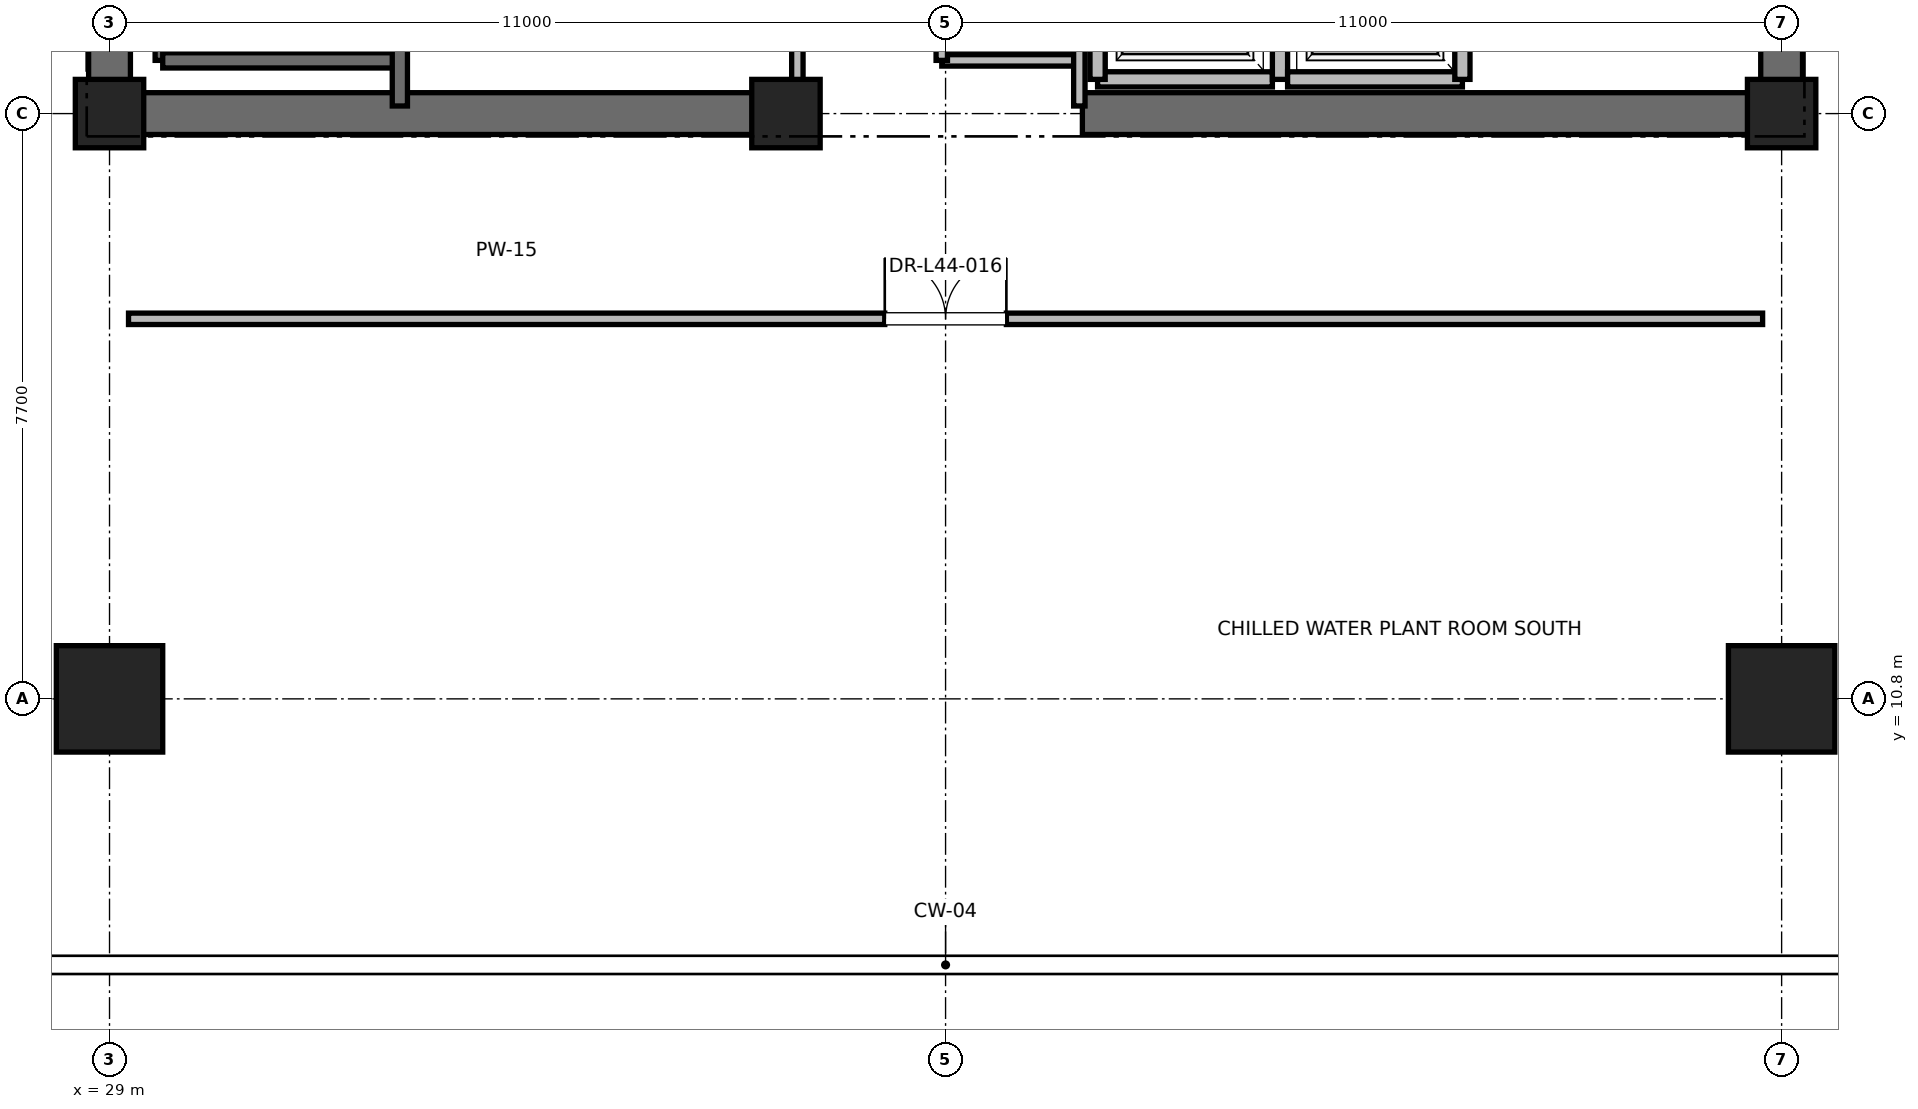
"""IFC4 building model, lengths in metres.
Left out: names, types, materials, properties, quantities, classifications, styles, units other than length and angle.
Written with IfcOpenShell. Run it as: python <this file> out.ifc"""

import sys

from ifc_helpers import new_model, si_unit, direction, frame, frame_2d, origin, origin_2d, place, context, subcontext, project, spatial, rectangle, extrude, element, fill, save


model = new_model("IFC4")
c1 = context("Model", 3, precision=1e-05, world=origin(), true_north=direction((0.0, 1.0)))
c2 = subcontext(c1, "Body", "Model", "MODEL_VIEW")
j1 = project(units=[si_unit("LENGTHUNIT", "METRE"), si_unit("PLANEANGLEUNIT", "RADIAN")], contexts=[c1])
p1 = place(None, origin())
s1 = spatial("IfcSite", under=j1, at=p1, CompositionType="ELEMENT")
p2 = place(p1, origin())
s2 = spatial("IfcBuilding", under=s1, at=p2, CompositionType="ELEMENT")
p3 = place(p2, frame((0.0, 0.0, 189.4)))
s3 = spatial("IfcBuildingStorey", under=s2, at=p3, CompositionType="ELEMENT", Elevation=189.4)
for number, where, z_axis, x_axis in (
    (1, (29.0, 10.8, 0.0), (0.0, 0.0, 1.0), (1.0, 0.0, 0.0)),
    (2, (51.0, 10.8, 0.0), (0.0, 0.0, 1.0), (1.0, 0.0, 0.0)),
):
    element("IfcColumn", number, at=place(p3, frame(where, z_axis=z_axis, x_axis=x_axis)), inside=s3, PredefinedType="COLUMN", context=c2, shape_type="SweptSolid", body=[
        extrude(rectangle(XDim=1.4, YDim=1.4, at=origin_2d()), origin(), (0.0, 0.0, 1.0), 5.4),
    ])
for number, where, z_axis, x_axis in (
    (3, (29.0, 18.5, 0.0), (0.0, 0.0, 1.0), (1.0, 0.0, 0.0)),
    (4, (51.0, 18.5, 0.0), (0.0, 0.0, 1.0), (1.0, 0.0, 0.0)),
    (5, (37.9, 18.5, 0.0), (0.0, 0.0, 1.0), (1.0, 0.0, 0.0)),
):
    element("IfcColumn", number, at=place(p3, frame(where, z_axis=z_axis, x_axis=x_axis)), inside=s3, PredefinedType="PILASTER", context=c2, shape_type="SweptSolid", body=[
        extrude(rectangle(XDim=0.9, YDim=0.9, at=origin_2d()), origin(), (0.0, 0.0, 1.0), 5.4),
    ])
for number, where, z_axis, x_axis in (
    (6, (29.0, 18.5, 0.0), (0.0, 0.0, 1.0), (1.0, 0.0, 0.0)),
    (7, (41.8, 18.5, 0.0), (0.0, 0.0, 1.0), (1.0, 0.0, 0.0)),
):
    element("IfcWall", number, at=place(p3, frame(where, z_axis=z_axis, x_axis=x_axis)), inside=s3, PredefinedType="SHEAR", context=c2, shape_type="SweptSolid", body=[
        extrude(rectangle(XDim=9.2, YDim=0.55, at=frame_2d((4.6, 0.0))), origin(), (0.0, 0.0, 1.0), 5.1),
    ])
p4 = place(p3, frame((29.0, 18.5, 0.0), z_axis=(0.0, 0.0, 1.0), x_axis=(0.0, 1.0, 0.0)))
e8 = element("IfcWall", 8, at=p4, inside=s3, PredefinedType="SHEAR", context=c2, shape_type="SweptSolid", body=[
    extrude(rectangle(XDim=8.8, YDim=0.55, at=frame_2d((4.4, 0.0))), origin(), (0.0, 0.0, 1.0), 5.1),
])
p5 = place(p3, frame((51.0, 18.5, 0.0), z_axis=(0.0, 0.0, 1.0), x_axis=(0.0, 1.0, 0.0)))
e9 = element("IfcWall", 9, at=p5, inside=s3, PredefinedType="SHEAR", context=c2, shape_type="SweptSolid", body=[
    extrude(rectangle(XDim=5.8, YDim=0.55, at=frame_2d((2.9, 0.0))), origin(), (0.0, 0.0, 1.0), 5.1),
])
p6 = place(p3, frame((29.7, 19.2, 0.0), z_axis=(0.0, 0.0, 1.0), x_axis=(0.0, 1.0, 0.0)))
e10 = element("IfcWall", 10, at=p6, inside=s3, PredefinedType="SOLIDWALL", context=c2, shape_type="SweptSolid", body=[
    extrude(rectangle(XDim=8.15, YDim=0.2, at=frame_2d((4.075, 0.0))), origin(), (0.0, 0.0, 1.0), 5.1),
])
p7 = place(p3, frame((29.7, 19.2, 0.0), z_axis=(0.0, 0.0, 1.0), x_axis=(1.0, 0.0, 0.0)))
e11 = element("IfcWall", 11, at=p7, inside=s3, PredefinedType="SOLIDWALL", context=c2, shape_type="SweptSolid", body=[
    extrude(rectangle(XDim=3.12, YDim=0.2, at=frame_2d((1.56, 0.0))), origin(), (0.0, 0.0, 1.0), 5.1),
])
p8 = place(p3, frame((32.82, 18.6, 0.0), z_axis=(0.0, 0.0, 1.0), x_axis=(0.0, 1.0, 0.0)))
e12 = element("IfcWall", 12, at=p8, inside=s3, PredefinedType="SOLIDWALL", context=c2, shape_type="SweptSolid", body=[
    extrude(rectangle(XDim=8.78, YDim=0.2, at=frame_2d((4.39, 0.0))), origin(), (0.0, 0.0, 1.0), 5.1),
])
p9 = place(p3, frame((42.0, 18.95, 0.0), z_axis=(0.0, 0.0, 1.0), x_axis=(1.0, 0.0, 0.0)))
e13 = element("IfcWall", 13, at=p9, inside=s3, PredefinedType="SOLIDWALL", context=c2, shape_type="SweptSolid", body=[
    extrude(rectangle(XDim=2.3, YDim=0.2, at=frame_2d((1.15, 0.0))), origin(), (0.0, 0.0, 1.0), 4.08),
])
p10 = place(p3, frame((42.0, 21.55, 0.0), z_axis=(0.0, 0.0, 1.0), x_axis=(0.0, -1.0, 0.0)))
e14 = element("IfcWall", 14, at=p10, inside=s3, PredefinedType="SOLIDWALL", context=c2, shape_type="SweptSolid", body=[
    extrude(rectangle(XDim=2.6, YDim=0.2, at=frame_2d((1.3, 0.0))), origin(), (0.0, 0.0, 1.0), 4.08),
])
p11 = place(p3, frame((44.4, 18.95, 0.0), z_axis=(0.0, 0.0, 1.0), x_axis=(0.0, 1.0, 0.0)))
e15 = element("IfcWall", 15, at=p11, inside=s3, PredefinedType="SOLIDWALL", context=c2, shape_type="SweptSolid", body=[
    extrude(rectangle(XDim=2.6, YDim=0.2, at=frame_2d((1.3, 0.0))), origin(), (0.0, 0.0, 1.0), 5.1),
])
p12 = place(p3, frame((44.5, 18.95, 0.0), z_axis=(0.0, 0.0, 1.0), x_axis=(1.0, 0.0, 0.0)))
e16 = element("IfcWall", 16, at=p12, inside=s3, PredefinedType="SOLIDWALL", context=c2, shape_type="SweptSolid", body=[
    extrude(rectangle(XDim=2.3, YDim=0.2, at=frame_2d((1.15, 0.0))), origin(), (0.0, 0.0, 1.0), 5.1),
])
p13 = place(p3, frame((46.8, 18.95, 0.0), z_axis=(0.0, 0.0, 1.0), x_axis=(0.0, 1.0, 0.0)))
e17 = element("IfcWall", 17, at=p13, inside=s3, PredefinedType="SOLIDWALL", context=c2, shape_type="SweptSolid", body=[
    extrude(rectangle(XDim=2.6, YDim=0.2, at=frame_2d((1.3, 0.0))), origin(), (0.0, 0.0, 1.0), 5.1),
])
p14 = place(p3, frame((39.95, 19.2, 0.0), z_axis=(0.0, 0.0, 1.0), x_axis=(1.0, 0.0, 0.0)))
e18 = element("IfcWall", 18, at=p14, inside=s3, PredefinedType="PARTITIONING", context=c2, shape_type="SweptSolid", body=[
    extrude(rectangle(XDim=1.81, YDim=0.15, at=frame_2d((0.905, 0.0))), origin(), (0.0, 0.0, 1.0), 2.85),
])
p15 = place(p3, frame((41.76, 18.6, 0.0), z_axis=(0.0, 0.0, 1.0), x_axis=(0.0, 1.0, 0.0)))
e19 = element("IfcWall", 19, at=p15, inside=s3, PredefinedType="PARTITIONING", context=c2, shape_type="SweptSolid", body=[
    extrude(rectangle(XDim=3.6, YDim=0.15, at=frame_2d((1.8, 0.0))), origin(), (0.0, 0.0, 1.0), 2.85),
])
p16 = place(p3, frame((39.95, 19.2, 0.0), z_axis=(0.0, 0.0, 1.0), x_axis=(0.0, 1.0, 0.0)))
e20 = element("IfcWall", 20, at=p16, inside=s3, PredefinedType="PARTITIONING", context=c2, shape_type="SweptSolid", body=[
    extrude(rectangle(XDim=3.0, YDim=0.15, at=frame_2d((1.5, 0.0))), origin(), (0.0, 0.0, 1.0), 2.85),
])
p17 = place(p16, frame((1.05, 0.0, 0.0)))
e21 = element("IfcOpeningElement", 21, at=p17, cuts=e20, PredefinedType="OPENING", context=c2, shape_type="SweptSolid", body=[
    extrude(rectangle(XDim=0.9, YDim=2.1, at=frame_2d((0.45, 1.05))), frame((0.0, 0.075, 0.0), z_axis=(0.0, -1.0, 0.0), x_axis=(1.0, 0.0, 0.0)), (0.0, 0.0, 1.0), 0.15),
])
p18 = place(p3, frame((38.05, 18.6, 0.0), z_axis=(0.0, 0.0, 1.0), x_axis=(0.0, 1.0, 0.0)))
e22 = element("IfcWall", 22, at=p18, inside=s3, PredefinedType="PARTITIONING", context=c2, shape_type="SweptSolid", body=[
    extrude(rectangle(XDim=4.46, YDim=0.15, at=frame_2d((2.23, 0.0))), origin(), (0.0, 0.0, 1.0), 2.85),
])
p19 = place(p18, frame((1.79, 0.0, 0.0)))
e23 = element("IfcOpeningElement", 23, at=p19, cuts=e22, PredefinedType="OPENING", context=c2, shape_type="SweptSolid", body=[
    extrude(rectangle(XDim=0.88, YDim=2.1, at=frame_2d((0.44, 1.05))), frame((0.0, 0.075, 0.0), z_axis=(0.0, -1.0, 0.0), x_axis=(1.0, 0.0, 0.0)), (0.0, 0.0, 1.0), 0.15),
])
p20 = place(p3, frame((29.25, 15.8, 0.0), z_axis=(0.0, 0.0, 1.0), x_axis=(1.0, 0.0, 0.0)))
e24 = element("IfcWall", 24, at=p20, inside=s3, PredefinedType="PARTITIONING", context=c2, shape_type="SweptSolid", body=[
    extrude(rectangle(XDim=21.5, YDim=0.15, at=frame_2d((10.75, 0.0))), origin(), (0.0, 0.0, 1.0), 2.85),
])
p21 = place(p20, frame((9.95, 0.0, 0.0)))
e25 = element("IfcOpeningElement", 25, at=p21, cuts=e24, PredefinedType="OPENING", context=c2, shape_type="SweptSolid", body=[
    extrude(rectangle(XDim=1.6, YDim=2.25, at=frame_2d((0.8, 1.125))), frame((0.0, 0.075, 0.0), z_axis=(0.0, -1.0, 0.0), x_axis=(1.0, 0.0, 0.0)), (0.0, 0.0, 1.0), 0.15),
])
p22 = place(p21, origin())
e26 = element("IfcDoor", 26, at=p22, inside=s3, OperationType="DOUBLE_DOOR_SINGLE_SWING", PredefinedType="DOOR", context=c2, shape_type="SweptSolid", body=[
    extrude(rectangle(XDim=1.6, YDim=2.25, at=frame_2d((0.8, 1.125))), frame((0.0, 0.025, 0.0), z_axis=(0.0, -1.0, 0.0), x_axis=(1.0, 0.0, 0.0)), (0.0, 0.0, 1.0), 0.05),
])
fill(e25, e26)
save(model, sys.argv[1])
